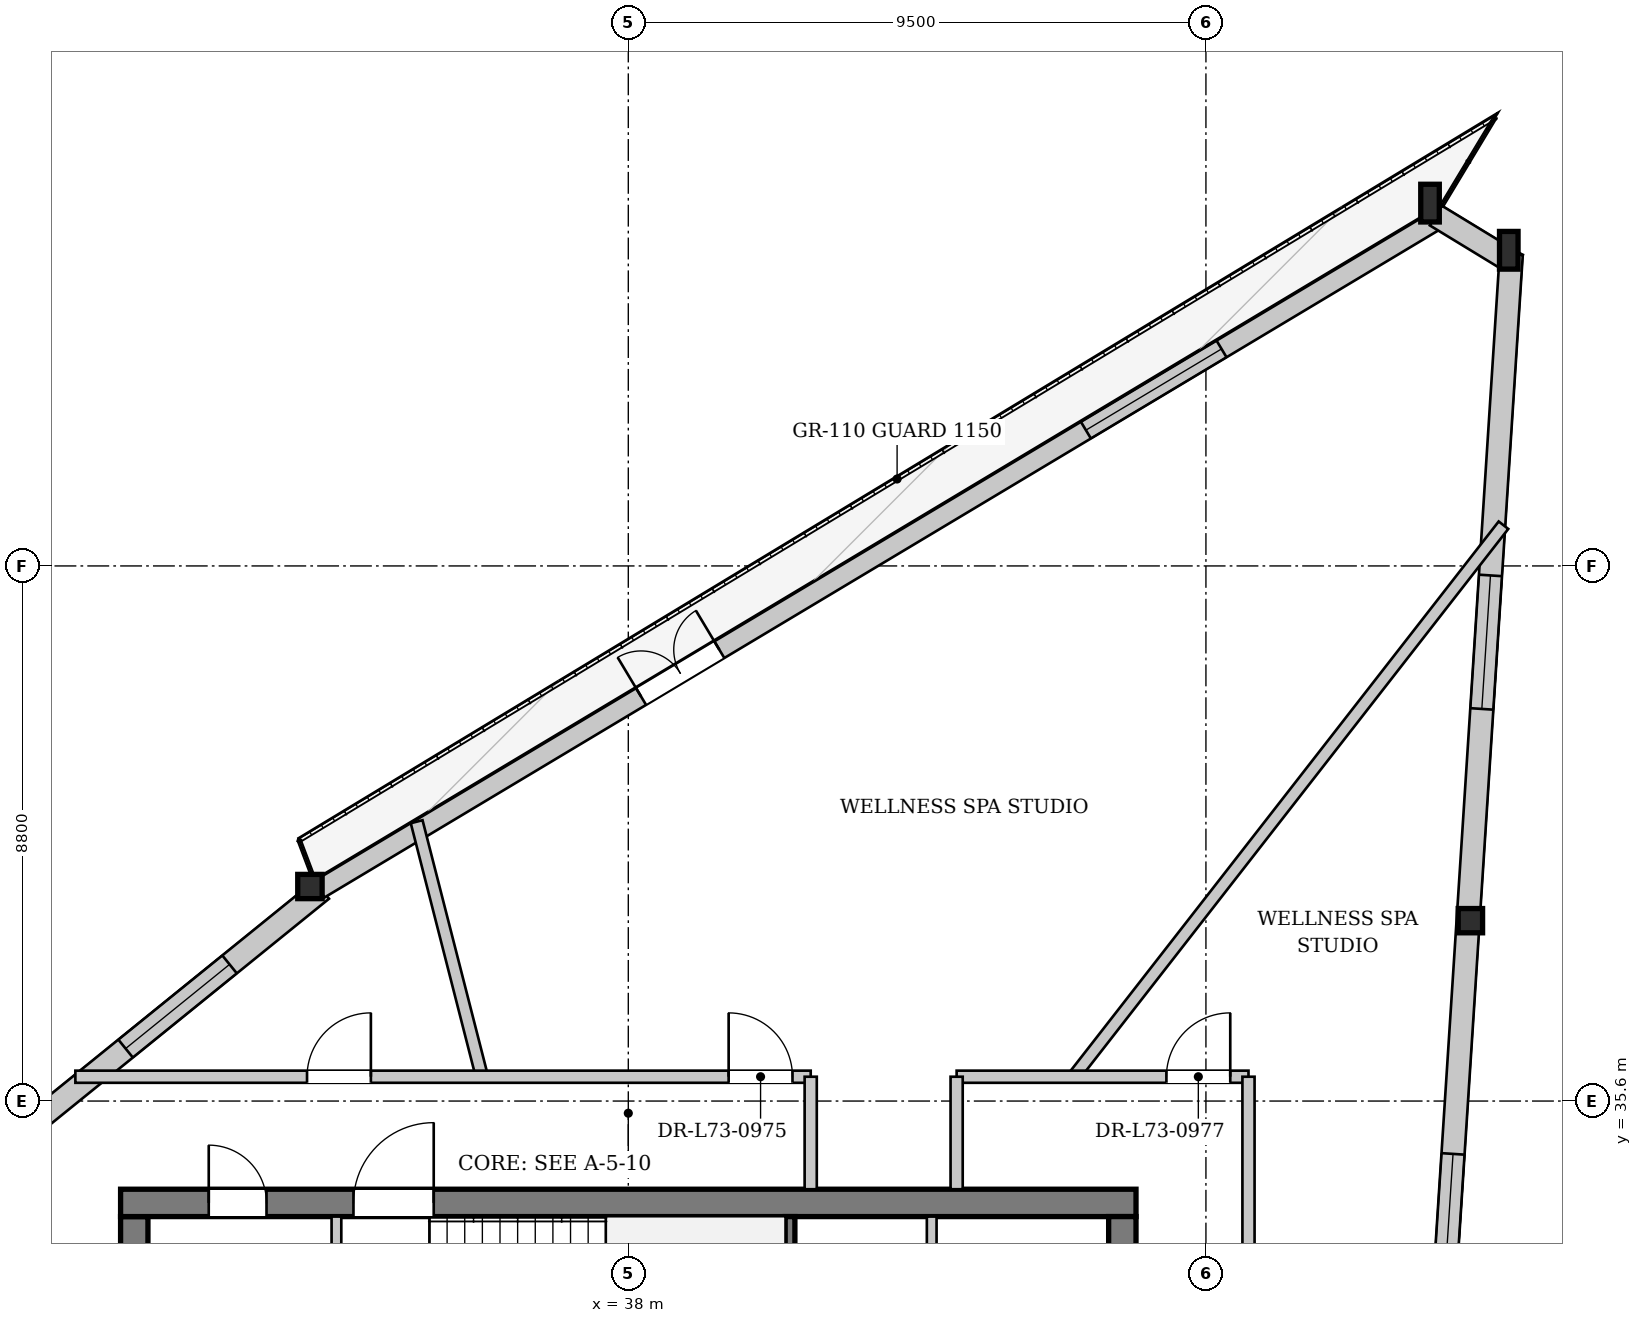
"""IFC4 building model, lengths in metres.
Left out: names, types, materials, properties, quantities, classifications, styles, units other than length and angle.
Written with IfcOpenShell. Run it as: python <this file> out.ifc"""

import sys

from ifc_helpers import new_model, si_unit, direction, frame, frame_2d, origin, origin_2d, place, context, subcontext, project, spatial, rectangle, i_section, extrude, source, transform, mapped, element, fill, save


model = new_model("IFC4")
c1 = context("Model", 3, precision=1e-05, world=origin(), true_north=direction((0.0, 1.0)))
c2 = subcontext(c1, "Body", "Model", "MODEL_VIEW")
j1 = project(units=[si_unit("LENGTHUNIT", "METRE"), si_unit("PLANEANGLEUNIT", "RADIAN")], contexts=[c1])
p1 = place(None, origin())
s1 = spatial("IfcSite", under=j1, at=p1, CompositionType="ELEMENT")
p2 = place(p1, origin())
s2 = spatial("IfcBuilding", under=s1, at=p2, CompositionType="ELEMENT")
p3 = place(p2, frame((0.0, 0.0, 274.1)))
s3 = spatial("IfcBuildingStorey", under=s2, at=p3, CompositionType="ELEMENT", Elevation=274.1)
m1 = source(origin(), c2, "Body", "SweptSolid", [
    extrude(i_section(OverallWidth=0.305, OverallDepth=0.62, WebThickness=0.021, FlangeThickness=0.04, at=origin_2d()), origin(), (0.0, 0.0, 1.0), 3.469),
])
p4 = place(p3, frame((52.711, 49.514, 0.0), z_axis=(-0.13280190152, 0.044619186838, 0.990137759667), x_axis=(-0.318487425697, -0.947927085631, 0.0)))
e1 = element("IfcColumn", 1, at=p4, inside=s3, PredefinedType="COLUMN", context=c2, shape_type="MappedRepresentation", body=[
    mapped(m1, transform((0.0, 0.0, 0.0), x_axis=(1.0, 0.0, 0.0), y_axis=(0.0, 1.0, 0.0), z_axis=(0.0, 0.0, 1.0), scale=1.0)),
])
m2 = source(origin(), c2, "Body", "SweptSolid", [
    extrude(i_section(OverallWidth=0.305, OverallDepth=0.62, WebThickness=0.021, FlangeThickness=0.04, at=origin_2d()), origin(), (0.0, 0.0, 1.0), 3.458),
])
p5 = place(p3, frame((51.38, 50.325, 0.0), z_axis=(-0.112336130826, 0.024288893152, 0.993373365548), x_axis=(-0.211332792528, -0.97741416544, 0.0)))
e2 = element("IfcColumn", 2, at=p5, inside=s3, PredefinedType="COLUMN", context=c2, shape_type="MappedRepresentation", body=[
    mapped(m2, transform((0.0, 0.0, 0.0), x_axis=(1.0, 0.0, 0.0), y_axis=(0.0, 1.0, 0.0), z_axis=(0.0, 0.0, 1.0), scale=1.0)),
])
m3 = source(origin(), c2, "Body", "SweptSolid", [
    extrude(i_section(OverallWidth=0.401, OverallDepth=0.399, WebThickness=0.022, FlangeThickness=0.034, at=origin_2d()), origin(), (0.0, 0.0, 1.0), 3.443),
])
p6 = place(p3, frame((32.839, 39.222, 0.0), z_axis=(-0.043464072113, -0.054879595131, 0.99754654251), x_axis=(0.783922584395, -0.620858584282, 0.0)))
e3 = element("IfcColumn", 3, at=p6, inside=s3, PredefinedType="COLUMN", context=c2, shape_type="MappedRepresentation", body=[
    mapped(m3, transform((0.0, 0.0, 0.0), x_axis=(1.0, 0.0, 0.0), y_axis=(0.0, 1.0, 0.0), z_axis=(0.0, 0.0, 1.0), scale=1.0)),
])
m4 = source(origin(), c2, "Body", "SweptSolid", [
    extrude(i_section(OverallWidth=0.401, OverallDepth=0.399, WebThickness=0.022, FlangeThickness=0.034, at=origin_2d()), origin(), (0.0, 0.0, 1.0), 3.452),
])
p7 = place(p3, frame((51.997, 38.477, 0.0), z_axis=(-0.085433681013, 0.051627969487, 0.995005346174), x_axis=(-0.517202143643, -0.855863273316, 0.0)))
e4 = element("IfcColumn", 4, at=p7, inside=s3, PredefinedType="COLUMN", context=c2, shape_type="MappedRepresentation", body=[
    mapped(m4, transform((0.0, 0.0, 0.0), x_axis=(1.0, 0.0, 0.0), y_axis=(0.0, 1.0, 0.0), z_axis=(0.0, 0.0, 1.0), scale=1.0)),
])
p8 = place(p3, frame((16.162, 25.477, 0.0), z_axis=(0.0, 0.0, 1.0), x_axis=(0.777216193482, 0.629233651825, 0.0)))
e5 = element("IfcWall", 5, at=p8, inside=s3, PredefinedType="SOLIDWALL", context=c2, shape_type="SweptSolid", body=[
    extrude(rectangle(XDim=21.611, YDim=0.38, at=frame_2d((10.805, 0.0))), origin(), (0.0, 0.0, 1.0), 2.812),
])
p9 = place(p8, frame((4.951, 0.0, 0.442)))
e6 = element("IfcOpeningElement", 6, at=p9, cuts=e5, PredefinedType="OPENING", context=c2, shape_type="SweptSolid", body=[
    extrude(rectangle(XDim=2.2, YDim=2.25, at=frame_2d((1.1, 1.125))), frame((0.0, 0.2, 0.0), z_axis=(0.0, -1.0, 0.0), x_axis=(1.0, 0.0, 0.0)), (0.0, 0.0, 1.0), 0.4),
])
p10 = place(p8, frame((17.46, 0.0, 0.442)))
e7 = element("IfcOpeningElement", 7, at=p10, cuts=e5, PredefinedType="OPENING", context=c2, shape_type="SweptSolid", body=[
    extrude(rectangle(XDim=2.2, YDim=2.25, at=frame_2d((1.1, 1.125))), frame((0.0, 0.2, 0.0), z_axis=(0.0, -1.0, 0.0), x_axis=(1.0, 0.0, 0.0)), (0.0, 0.0, 1.0), 0.4),
])
p11 = place(p3, frame((32.921, 39.085, 0.0), z_axis=(0.0, 0.0, 1.0), x_axis=(0.8579501269, 0.513732984879, 0.0)))
e8 = element("IfcWall", 8, at=p11, inside=s3, PredefinedType="SOLIDWALL", context=c2, shape_type="SweptSolid", body=[
    extrude(rectangle(XDim=21.611, YDim=0.32, at=frame_2d((10.805, 0.0))), origin(), (0.0, 0.0, 1.0), 2.812),
])
p12 = place(p11, frame((6.165, 0.0, 0.0)))
e9 = element("IfcOpeningElement", 9, at=p12, cuts=e8, PredefinedType="OPENING", context=c2, shape_type="SweptSolid", body=[
    extrude(rectangle(XDim=1.5, YDim=2.3, at=frame_2d((0.75, 1.15))), frame((0.0, 0.17, 0.0), z_axis=(0.0, -1.0, 0.0), x_axis=(1.0, 0.0, 0.0)), (0.0, 0.0, 1.0), 0.34),
])
p13 = place(p11, frame((14.692, 0.0, 0.342)))
e10 = element("IfcOpeningElement", 10, at=p13, cuts=e8, PredefinedType="OPENING", context=c2, shape_type="SweptSolid", body=[
    extrude(rectangle(XDim=2.6, YDim=2.35, at=frame_2d((1.3, 1.175))), frame((0.0, 0.17, 0.0), z_axis=(0.0, -1.0, 0.0), x_axis=(1.0, 0.0, 0.0)), (0.0, 0.0, 1.0), 0.34),
])
p14 = place(p3, frame((51.281, 50.162, 0.0), z_axis=(0.0, 0.0, 1.0), x_axis=(0.854004945666, -0.520264887127, 0.0)))
e11 = element("IfcWall", 11, at=p14, inside=s3, PredefinedType="SOLIDWALL", context=c2, shape_type="SweptSolid", body=[
    extrude(rectangle(XDim=1.559, YDim=0.38, at=frame_2d((0.779, 0.0))), origin(), (0.0, 0.0, 1.0), 2.812),
])
p15 = place(p3, frame((52.521, 49.526, 0.0), z_axis=(0.0, 0.0, 1.0), x_axis=(-0.064581194321, -0.99791245575, 0.0)))
e12 = element("IfcWall", 12, at=p15, inside=s3, PredefinedType="SOLIDWALL", context=c2, shape_type="SweptSolid", body=[
    extrude(rectangle(XDim=22.119, YDim=0.38, at=frame_2d((11.06, 0.0))), origin(), (0.0, 0.0, 1.0), 2.812),
])
p16 = place(p15, frame((5.293, 0.0, 0.442)))
e13 = element("IfcOpeningElement", 13, at=p16, cuts=e12, PredefinedType="OPENING", context=c2, shape_type="SweptSolid", body=[
    extrude(rectangle(XDim=2.2, YDim=2.25, at=frame_2d((1.1, 1.125))), frame((0.0, 0.2, 0.0), z_axis=(0.0, -1.0, 0.0), x_axis=(1.0, 0.0, 0.0)), (0.0, 0.0, 1.0), 0.4),
])
p17 = place(p15, frame((14.826, 0.0, 0.442)))
e14 = element("IfcOpeningElement", 14, at=p17, cuts=e12, PredefinedType="OPENING", context=c2, shape_type="SweptSolid", body=[
    extrude(rectangle(XDim=2.2, YDim=2.25, at=frame_2d((1.1, 1.125))), frame((0.0, 0.2, 0.0), z_axis=(0.0, -1.0, 0.0), x_axis=(1.0, 0.0, 0.0)), (0.0, 0.0, 1.0), 0.4),
])
p18 = place(p3, frame((29.875, 19.5, 0.0), z_axis=(0.0, 0.0, 1.0), x_axis=(0.0, 1.0, 0.0)))
e15 = element("IfcWall", 15, at=p18, inside=s3, PredefinedType="SHEAR", context=c2, shape_type="SweptSolid", body=[
    extrude(rectangle(XDim=14.2, YDim=0.45, at=frame_2d((7.1, 0.0))), origin(), (0.0, 0.0, 1.0), 3.32),
])
p19 = place(p18, frame((7.42, 0.0, 0.0)))
e16 = element("IfcOpeningElement", 16, at=p19, cuts=e15, PredefinedType="OPENING", context=c2, shape_type="SweptSolid", body=[
    extrude(rectangle(XDim=1.6, YDim=2.2, at=frame_2d((0.8, 1.1))), frame((0.0, 0.235, 0.0), z_axis=(0.0, -1.0, 0.0), x_axis=(1.0, 0.0, 0.0)), (0.0, 0.0, 1.0), 0.47),
])
p20 = place(p3, frame((29.65, 33.925, 0.0), z_axis=(0.0, 0.0, 1.0), x_axis=(1.0, 0.0, 0.0)))
e17 = element("IfcWall", 17, at=p20, inside=s3, PredefinedType="SHEAR", context=c2, shape_type="SweptSolid", body=[
    extrude(rectangle(XDim=16.7, YDim=0.45, at=frame_2d((8.35, 0.0))), origin(), (0.0, 0.0, 1.0), 3.32),
])
p21 = place(p20, frame((1.45, 0.0, 0.0)))
e18 = element("IfcOpeningElement", 18, at=p21, cuts=e17, PredefinedType="OPENING", context=c2, shape_type="SweptSolid", body=[
    extrude(rectangle(XDim=0.95, YDim=2.1, at=frame_2d((0.475, 1.05))), frame((0.0, 0.235, 0.0), z_axis=(0.0, -1.0, 0.0), x_axis=(1.0, 0.0, 0.0)), (0.0, 0.0, 1.0), 0.47),
])
p22 = place(p20, frame((3.83, 0.0, 0.0)))
e19 = element("IfcOpeningElement", 19, at=p22, cuts=e17, PredefinedType="OPENING", context=c2, shape_type="SweptSolid", body=[
    extrude(rectangle(XDim=1.32, YDim=2.2, at=frame_2d((0.66, 1.1))), frame((0.0, 0.235, 0.0), z_axis=(0.0, -1.0, 0.0), x_axis=(1.0, 0.0, 0.0)), (0.0, 0.0, 1.0), 0.47),
])
p23 = place(p3, frame((46.125, 33.7, 0.0), z_axis=(0.0, 0.0, 1.0), x_axis=(0.0, -1.0, 0.0)))
e20 = element("IfcWall", 20, at=p23, inside=s3, PredefinedType="SHEAR", context=c2, shape_type="SweptSolid", body=[
    extrude(rectangle(XDim=14.2, YDim=0.45, at=frame_2d((7.1, 0.0))), origin(), (0.0, 0.0, 1.0), 3.32),
])
p24 = place(p23, frame((5.18, 0.0, 0.0)))
e21 = element("IfcOpeningElement", 21, at=p24, cuts=e20, PredefinedType="OPENING", context=c2, shape_type="SweptSolid", body=[
    extrude(rectangle(XDim=1.6, YDim=2.2, at=frame_2d((0.8, 1.1))), frame((0.0, 0.235, 0.0), z_axis=(0.0, -1.0, 0.0), x_axis=(1.0, 0.0, 0.0)), (0.0, 0.0, 1.0), 0.47),
])
p25 = place(p23, frame((2.05, 0.0, 0.0)))
e22 = element("IfcOpeningElement", 22, at=p25, cuts=e20, PredefinedType="OPENING", context=c2, shape_type="SweptSolid", body=[
    extrude(rectangle(XDim=0.95, YDim=2.1, at=frame_2d((0.475, 1.05))), frame((0.0, 0.235, 0.0), z_axis=(0.0, -1.0, 0.0), x_axis=(1.0, 0.0, 0.0)), (0.0, 0.0, 1.0), 0.47),
])
p26 = place(p3, frame((40.66, 30.6, 0.0), z_axis=(0.0, 0.0, 1.0), x_axis=(0.0, 1.0, 0.0)))
e23 = element("IfcWall", 23, at=p26, inside=s3, PredefinedType="PARTITIONING", context=c2, shape_type="SweptSolid", body=[
    extrude(rectangle(XDim=3.1, YDim=0.16, at=frame_2d((1.55, 0.0))), origin(), (0.0, 0.0, 1.0), 3.32),
])
p27 = place(p3, frame((33.2, 28.44, 0.0), z_axis=(0.0, 0.0, 1.0), x_axis=(0.0, 1.0, 0.0)))
e24 = element("IfcWall", 24, at=p27, inside=s3, PredefinedType="PARTITIONING", context=c2, shape_type="SweptSolid", body=[
    extrude(rectangle(XDim=5.26, YDim=0.16, at=frame_2d((2.63, 0.0))), origin(), (0.0, 0.0, 1.0), 3.32),
])
p28 = place(p3, frame((42.99, 30.68, 0.0), z_axis=(0.0, 0.0, 1.0), x_axis=(0.0, 1.0, 0.0)))
e25 = element("IfcWall", 25, at=p28, inside=s3, PredefinedType="PARTITIONING", context=c2, shape_type="SweptSolid", body=[
    extrude(rectangle(XDim=3.02, YDim=0.16, at=frame_2d((1.51, 0.0))), origin(), (0.0, 0.0, 1.0), 3.32),
])
p29 = place(p28, frame((0.95, 0.0, 0.0)))
e26 = element("IfcOpeningElement", 26, at=p29, cuts=e25, PredefinedType="OPENING", context=c2, shape_type="SweptSolid", body=[
    extrude(rectangle(XDim=0.95, YDim=2.1, at=frame_2d((0.475, 1.05))), frame((0.0, 0.09, 0.0), z_axis=(0.0, -1.0, 0.0), x_axis=(1.0, 0.0, 0.0)), (0.0, 0.0, 1.0), 0.18),
])
p30 = place(p3, frame((45.325, 36.0, 0.0), z_axis=(0.0, 0.0, 1.0), x_axis=(0.614681143214, 0.788775691928, 0.0)))
e27 = element("IfcWall", 27, at=p30, inside=s3, PredefinedType="PARTITIONING", context=c2, shape_type="SweptSolid", body=[
    extrude(rectangle(XDim=11.499, YDim=0.2, at=frame_2d((5.75, 0.0))), origin(), (0.0, 0.0, 1.0), 3.32),
])
p31 = place(p3, frame((35.593, 36.0, 0.0), z_axis=(0.0, 0.0, 1.0), x_axis=(-0.248038825482, 0.968750092157, 0.0)))
e28 = element("IfcWall", 28, at=p31, inside=s3, PredefinedType="PARTITIONING", context=c2, shape_type="SweptSolid", body=[
    extrude(rectangle(XDim=4.329, YDim=0.2, at=frame_2d((2.165, 0.0))), origin(), (0.0, 0.0, 1.0), 3.32),
])
p32 = place(p3, frame((28.906, 36.0, 0.0), z_axis=(0.0, 0.0, 1.0), x_axis=(1.0, 0.0, 0.0)))
e29 = element("IfcWall", 29, at=p32, inside=s3, PredefinedType="PARTITIONING", context=c2, shape_type="SweptSolid", body=[
    extrude(rectangle(XDim=12.094, YDim=0.2, at=frame_2d((6.047, 0.0))), origin(), (0.0, 0.0, 1.0), 3.32),
])
p33 = place(p32, frame((10.744, 0.0, 0.0)))
e30 = element("IfcOpeningElement", 30, at=p33, cuts=e29, PredefinedType="OPENING", context=c2, shape_type="SweptSolid", body=[
    extrude(rectangle(XDim=1.05, YDim=2.2, at=frame_2d((0.525, 1.1))), frame((0.0, 0.11, 0.0), z_axis=(0.0, -1.0, 0.0), x_axis=(1.0, 0.0, 0.0)), (0.0, 0.0, 1.0), 0.22),
])
p34 = place(p32, frame((3.81, 0.0, 0.0)))
e31 = element("IfcOpeningElement", 31, at=p34, cuts=e29, PredefinedType="OPENING", context=c2, shape_type="SweptSolid", body=[
    extrude(rectangle(XDim=1.05, YDim=2.2, at=frame_2d((0.525, 1.1))), frame((0.0, 0.11, 0.0), z_axis=(0.0, -1.0, 0.0), x_axis=(1.0, 0.0, 0.0)), (0.0, 0.0, 1.0), 0.22),
])
p35 = place(p3, frame((41.0, 34.15, 0.0), z_axis=(0.0, 0.0, 1.0), x_axis=(0.0, 1.0, 0.0)))
e32 = element("IfcWall", 32, at=p35, inside=s3, PredefinedType="PARTITIONING", context=c2, shape_type="SweptSolid", body=[
    extrude(rectangle(XDim=1.85, YDim=0.2, at=frame_2d((0.925, 0.0))), origin(), (0.0, 0.0, 1.0), 3.32),
])
p36 = place(p3, frame((43.4, 36.0, 0.0), z_axis=(0.0, 0.0, 1.0), x_axis=(1.0, 0.0, 0.0)))
e33 = element("IfcWall", 33, at=p36, inside=s3, PredefinedType="PARTITIONING", context=c2, shape_type="SweptSolid", body=[
    extrude(rectangle(XDim=4.8, YDim=0.2, at=frame_2d((2.4, 0.0))), origin(), (0.0, 0.0, 1.0), 3.32),
])
p37 = place(p36, frame((3.45, 0.0, 0.0)))
e34 = element("IfcOpeningElement", 34, at=p37, cuts=e33, PredefinedType="OPENING", context=c2, shape_type="SweptSolid", body=[
    extrude(rectangle(XDim=1.05, YDim=2.2, at=frame_2d((0.525, 1.1))), frame((0.0, 0.11, 0.0), z_axis=(0.0, -1.0, 0.0), x_axis=(1.0, 0.0, 0.0)), (0.0, 0.0, 1.0), 0.22),
])
p38 = place(p3, frame((43.4, 34.15, 0.0), z_axis=(0.0, 0.0, 1.0), x_axis=(0.0, 1.0, 0.0)))
e35 = element("IfcWall", 35, at=p38, inside=s3, PredefinedType="PARTITIONING", context=c2, shape_type="SweptSolid", body=[
    extrude(rectangle(XDim=1.85, YDim=0.2, at=frame_2d((0.925, 0.0))), origin(), (0.0, 0.0, 1.0), 2.995),
])
p39 = place(p3, frame((48.2, 17.2, 0.0), z_axis=(0.0, 0.0, 1.0), x_axis=(0.0, 1.0, 0.0)))
e36 = element("IfcWall", 36, at=p39, inside=s3, PredefinedType="PARTITIONING", context=c2, shape_type="SweptSolid", body=[
    extrude(rectangle(XDim=18.8, YDim=0.2, at=frame_2d((9.4, 0.0))), origin(), (0.0, 0.0, 1.0), 2.945),
])
m5 = source(origin(), c2, "Body", "SweptSolid", [
    extrude(rectangle(XDim=2.2, YDim=2.25, at=frame_2d((1.1, 1.125))), frame((0.0, 0.03, 0.0), z_axis=(0.0, -1.0, 0.0), x_axis=(1.0, 0.0, 0.0)), (0.0, 0.0, 1.0), 0.06),
])
p40 = place(p10, origin())
e37 = element("IfcWindow", 37, at=p40, inside=s3, PartitioningType="SINGLE_PANEL", PredefinedType="WINDOW", context=c2, shape_type="MappedRepresentation", body=[
    mapped(m5, transform((0.0, 0.0, 0.0), x_axis=(1.0, 0.0, 0.0), y_axis=(0.0, 1.0, 0.0), z_axis=(0.0, 0.0, 1.0), scale=1.0)),
])
fill(e7, e37)
m6 = source(origin(), c2, "Body", "SweptSolid", [
    extrude(rectangle(XDim=1.5, YDim=2.3, at=frame_2d((0.75, 1.15))), frame((0.0, 0.025, 0.0), z_axis=(0.0, -1.0, 0.0), x_axis=(1.0, 0.0, 0.0)), (0.0, 0.0, 1.0), 0.05),
])
p41 = place(p12, origin())
e38 = element("IfcDoor", 38, at=p41, inside=s3, OperationType="DOUBLE_DOOR_SINGLE_SWING", PredefinedType="DOOR", context=c2, shape_type="MappedRepresentation", body=[
    mapped(m6, transform((0.0, 0.0, 0.0), x_axis=(1.0, 0.0, 0.0), y_axis=(0.0, 1.0, 0.0), z_axis=(0.0, 0.0, 1.0), scale=1.0)),
])
fill(e9, e38)
m7 = source(origin(), c2, "Body", "SweptSolid", [
    extrude(rectangle(XDim=2.6, YDim=2.35, at=frame_2d((1.3, 1.175))), frame((0.0, 0.03, 0.0), z_axis=(0.0, -1.0, 0.0), x_axis=(1.0, 0.0, 0.0)), (0.0, 0.0, 1.0), 0.06),
])
p42 = place(p13, origin())
e39 = element("IfcWindow", 39, at=p42, inside=s3, PartitioningType="SINGLE_PANEL", PredefinedType="WINDOW", context=c2, shape_type="MappedRepresentation", body=[
    mapped(m7, transform((0.0, 0.0, 0.0), x_axis=(1.0, 0.0, 0.0), y_axis=(0.0, 1.0, 0.0), z_axis=(0.0, 0.0, 1.0), scale=1.0)),
])
fill(e10, e39)
p43 = place(p16, origin())
e40 = element("IfcWindow", 40, at=p43, inside=s3, PartitioningType="SINGLE_PANEL", PredefinedType="WINDOW", context=c2, shape_type="MappedRepresentation", body=[
    mapped(m5, transform((0.0, 0.0, 0.0), x_axis=(1.0, 0.0, 0.0), y_axis=(0.0, 1.0, 0.0), z_axis=(0.0, 0.0, 1.0), scale=1.0)),
])
fill(e13, e40)
p44 = place(p17, origin())
e41 = element("IfcWindow", 41, at=p44, inside=s3, PartitioningType="SINGLE_PANEL", PredefinedType="WINDOW", context=c2, shape_type="MappedRepresentation", body=[
    mapped(m5, transform((0.0, 0.0, 0.0), x_axis=(1.0, 0.0, 0.0), y_axis=(0.0, 1.0, 0.0), z_axis=(0.0, 0.0, 1.0), scale=1.0)),
])
fill(e14, e41)
m8 = source(origin(), c2, "Body", "SweptSolid", [
    extrude(rectangle(XDim=0.95, YDim=2.1, at=frame_2d((0.475, 1.05))), frame((0.0, 0.025, 0.0), z_axis=(0.0, -1.0, 0.0), x_axis=(1.0, 0.0, 0.0)), (0.0, 0.0, 1.0), 0.05),
])
p45 = place(p21, origin())
e42 = element("IfcDoor", 42, at=p45, inside=s3, OperationType="SINGLE_SWING_LEFT", PredefinedType="DOOR", context=c2, shape_type="MappedRepresentation", body=[
    mapped(m8, transform((0.0, 0.0, 0.0), x_axis=(1.0, 0.0, 0.0), y_axis=(0.0, 1.0, 0.0), z_axis=(0.0, 0.0, 1.0), scale=1.0)),
])
fill(e18, e42)
m9 = source(origin(), c2, "Body", "SweptSolid", [
    extrude(rectangle(XDim=1.32, YDim=2.2, at=frame_2d((0.66, 1.1))), frame((0.0, 0.025, 0.0), z_axis=(0.0, -1.0, 0.0), x_axis=(1.0, 0.0, 0.0)), (0.0, 0.0, 1.0), 0.05),
])
p46 = place(p22, origin())
e43 = element("IfcDoor", 43, at=p46, inside=s3, OperationType="SINGLE_SWING_RIGHT", PredefinedType="DOOR", context=c2, shape_type="MappedRepresentation", body=[
    mapped(m9, transform((0.0, 0.0, 0.0), x_axis=(1.0, 0.0, 0.0), y_axis=(0.0, 1.0, 0.0), z_axis=(0.0, 0.0, 1.0), scale=1.0)),
])
fill(e19, e43)
m10 = source(origin(), c2, "Body", "SweptSolid", [
    extrude(rectangle(XDim=1.05, YDim=2.2, at=frame_2d((0.525, 1.1))), frame((0.0, 0.025, 0.0), z_axis=(0.0, -1.0, 0.0), x_axis=(1.0, 0.0, 0.0)), (0.0, 0.0, 1.0), 0.05),
])
p47 = place(p33, origin())
e44 = element("IfcDoor", 44, at=p47, inside=s3, OperationType="SINGLE_SWING_LEFT", PredefinedType="DOOR", context=c2, shape_type="MappedRepresentation", body=[
    mapped(m10, transform((0.0, 0.0, 0.0), x_axis=(1.0, 0.0, 0.0), y_axis=(0.0, 1.0, 0.0), z_axis=(0.0, 0.0, 1.0), scale=1.0)),
])
fill(e30, e44)
p48 = place(p34, origin())
e45 = element("IfcDoor", 45, at=p48, inside=s3, OperationType="SINGLE_SWING_RIGHT", PredefinedType="DOOR", context=c2, shape_type="MappedRepresentation", body=[
    mapped(m10, transform((0.0, 0.0, 0.0), x_axis=(1.0, 0.0, 0.0), y_axis=(0.0, 1.0, 0.0), z_axis=(0.0, 0.0, 1.0), scale=1.0)),
])
fill(e31, e45)
p49 = place(p37, origin())
e46 = element("IfcDoor", 46, at=p49, inside=s3, OperationType="SINGLE_SWING_RIGHT", PredefinedType="DOOR", context=c2, shape_type="MappedRepresentation", body=[
    mapped(m10, transform((0.0, 0.0, 0.0), x_axis=(1.0, 0.0, 0.0), y_axis=(0.0, 1.0, 0.0), z_axis=(0.0, 0.0, 1.0), scale=1.0)),
])
fill(e34, e46)
save(model, sys.argv[1])
